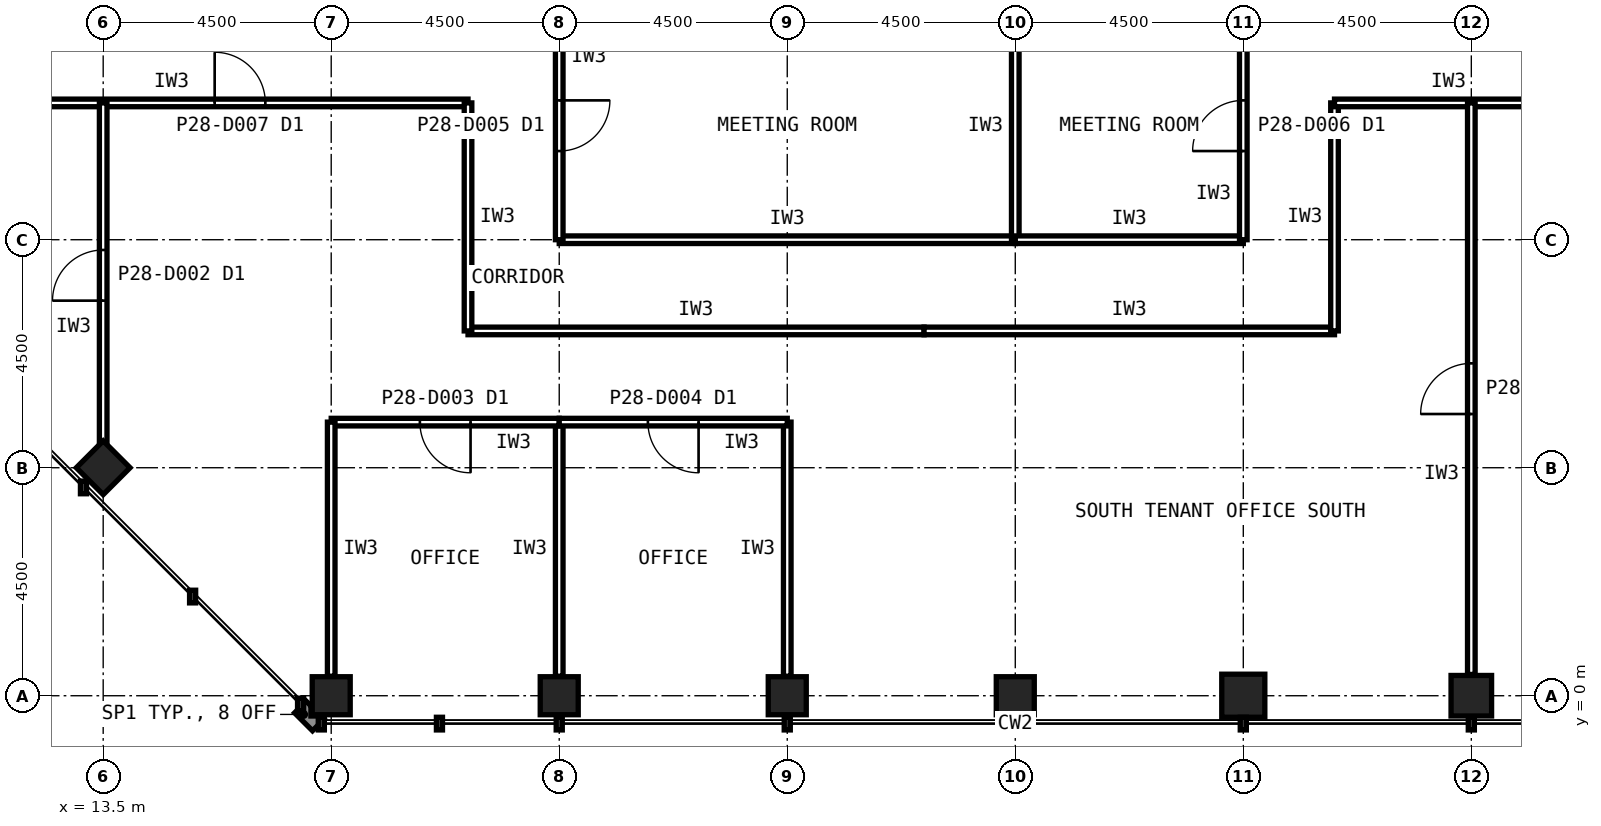
"""IFC4 building model, lengths in metres.
Left out: names, types, materials, properties, quantities, classifications, styles, units other than length and angle.
Written with IfcOpenShell. Run it as: python <this file> out.ifc"""

import sys

from ifc_helpers import new_model, si_unit, direction, frame, frame_2d, origin, origin_2d, place, context, subcontext, project, spatial, rectangle, hollow_rectangle, extrude, element, fill, save


model = new_model("IFC4")
c1 = context("Model", 3, precision=1e-05, world=origin(), true_north=direction((0.0, 1.0)))
c2 = subcontext(c1, "Body", "Model", "MODEL_VIEW")
j1 = project(units=[si_unit("LENGTHUNIT", "METRE"), si_unit("PLANEANGLEUNIT", "RADIAN")], contexts=[c1])
p1 = place(None, origin())
s1 = spatial("IfcSite", under=j1, at=p1, CompositionType="ELEMENT")
p2 = place(p1, origin())
s2 = spatial("IfcBuilding", under=s1, at=p2, CompositionType="ELEMENT")
p3 = place(p2, frame((0.0, 0.0, 119.6)))
s3 = spatial("IfcBuildingStorey", under=s2, at=p3, CompositionType="ELEMENT", Elevation=119.6)
for number, where, z_axis, x_axis in (
    (1, (18.0, 0.0, 0.0), (0.0, 0.0, 1.0), (1.0, 0.0, 0.0)),
    (2, (22.5, 0.0, 0.0), (0.0, 0.0, 1.0), (1.0, 0.0, 0.0)),
    (3, (27.0, 0.0, 0.0), (0.0, 0.0, 1.0), (1.0, 0.0, 0.0)),
    (4, (31.5, 0.0, 0.0), (0.0, 0.0, 1.0), (1.0, 0.0, 0.0)),
):
    element("IfcColumn", number, at=place(p3, frame(where, z_axis=z_axis, x_axis=x_axis)), inside=s3, PredefinedType="COLUMN", context=c2, shape_type="SweptSolid", body=[
        extrude(hollow_rectangle(XDim=0.75, YDim=0.75, WallThickness=0.04, at=origin_2d()), origin(), (0.0, 0.0, 1.0), 4.0),
    ])
p4 = place(p3, frame((36.0, 0.0, 0.0), z_axis=(0.0, 0.0, 1.0), x_axis=(1.0, 0.0, 0.0)))
e5 = element("IfcColumn", 5, at=p4, inside=s3, PredefinedType="COLUMN", context=c2, shape_type="SweptSolid", body=[
    extrude(hollow_rectangle(XDim=0.85, YDim=0.85, WallThickness=0.05, at=origin_2d()), origin(), (0.0, 0.0, 1.0), 4.0),
])
p5 = place(p3, frame((40.5, 0.0, 0.0), z_axis=(0.0, 0.0, 1.0), x_axis=(1.0, 0.0, 0.0)))
e6 = element("IfcColumn", 6, at=p5, inside=s3, PredefinedType="COLUMN", context=c2, shape_type="SweptSolid", body=[
    extrude(hollow_rectangle(XDim=0.8, YDim=0.8, WallThickness=0.045, at=origin_2d()), origin(), (0.0, 0.0, 1.0), 4.0),
])
p6 = place(p3, frame((13.5, 4.5, 0.0), z_axis=(0.0, 0.0, 1.0), x_axis=(0.707106781187, 0.707106781187, 0.0)))
e7 = element("IfcColumn", 7, at=p6, inside=s3, PredefinedType="COLUMN", context=c2, shape_type="SweptSolid", body=[
    extrude(hollow_rectangle(XDim=0.75, YDim=0.75, WallThickness=0.04, at=origin_2d()), origin(), (0.0, 0.0, 1.0), 4.0),
])
p7 = place(p3, frame((11.7, 11.7, 0.0), z_axis=(0.0, 0.0, 1.0), x_axis=(1.0, 0.0, 0.0)))
e8 = element("IfcWall", 8, at=p7, inside=s3, PredefinedType="PARTITIONING", context=c2, shape_type="SweptSolid", body=[
    extrude(rectangle(XDim=9.0, YDim=0.15, at=frame_2d((4.5, 0.0))), origin(), (0.0, 0.0, 1.0), 3.84),
])
p8 = place(p7, frame((4.0, 0.0, 0.0)))
e9 = element("IfcOpeningElement", 9, at=p8, cuts=e8, PredefinedType="OPENING", context=c2, shape_type="SweptSolid", body=[
    extrude(rectangle(XDim=1.0, YDim=2.1, at=frame_2d((0.5, 1.05))), frame((0.0, 0.085, 0.0), z_axis=(0.0, -1.0, 0.0), x_axis=(1.0, 0.0, 0.0)), (0.0, 0.0, 1.0), 0.17),
])
p9 = place(p3, frame((20.7, 7.2, 0.0), z_axis=(0.0, 0.0, 1.0), x_axis=(1.0, 0.0, 0.0)))
e10 = element("IfcWall", 10, at=p9, inside=s3, PredefinedType="PARTITIONING", context=c2, shape_type="SweptSolid", body=[
    extrude(rectangle(XDim=9.0, YDim=0.15, at=frame_2d((4.5, 0.0))), origin(), (0.0, 0.0, 1.0), 3.84),
])
p10 = place(p3, frame((29.7, 7.2, 0.0), z_axis=(0.0, 0.0, 1.0), x_axis=(1.0, 0.0, 0.0)))
e11 = element("IfcWall", 11, at=p10, inside=s3, PredefinedType="PARTITIONING", context=c2, shape_type="SweptSolid", body=[
    extrude(rectangle(XDim=8.1, YDim=0.15, at=frame_2d((4.05, 0.0))), origin(), (0.0, 0.0, 1.0), 3.84),
])
for number, where, z_axis, x_axis in (
    (12, (20.7, 11.7, 0.0), (0.0, 0.0, 1.0), (0.0, -1.0, 0.0)),
    (13, (37.8, 7.2, 0.0), (0.0, 0.0, 1.0), (0.0, 1.0, 0.0)),
    (14, (37.8, 11.7, 0.0), (0.0, 0.0, 1.0), (1.0, 0.0, 0.0)),
):
    element("IfcWall", number, at=place(p3, frame(where, z_axis=z_axis, x_axis=x_axis)), inside=s3, PredefinedType="PARTITIONING", context=c2, shape_type="SweptSolid", body=[
        extrude(rectangle(XDim=4.5, YDim=0.15, at=frame_2d((2.25, 0.0))), origin(), (0.0, 0.0, 1.0), 3.84),
    ])
p11 = place(p3, frame((22.5, 9.0, 0.0), z_axis=(0.0, 0.0, 1.0), x_axis=(1.0, 0.0, 0.0)))
e15 = element("IfcWall", 15, at=p11, inside=s3, PredefinedType="PARTITIONING", context=c2, shape_type="SweptSolid", body=[
    extrude(rectangle(XDim=9.0, YDim=0.15, at=frame_2d((4.5, 0.0))), origin(), (0.0, 0.0, 1.0), 3.84),
])
p12 = place(p3, frame((31.5, 9.0, 0.0), z_axis=(0.0, 0.0, 1.0), x_axis=(0.0, 1.0, 0.0)))
e16 = element("IfcWall", 16, at=p12, inside=s3, PredefinedType="PARTITIONING", context=c2, shape_type="SweptSolid", body=[
    extrude(rectangle(XDim=4.5, YDim=0.15, at=frame_2d((2.25, 0.0))), origin(), (0.0, 0.0, 1.0), 2.989),
])
p13 = place(p3, frame((22.5, 13.5, 0.0), z_axis=(0.0, 0.0, 1.0), x_axis=(0.0, -1.0, 0.0)))
e17 = element("IfcWall", 17, at=p13, inside=s3, PredefinedType="PARTITIONING", context=c2, shape_type="SweptSolid", body=[
    extrude(rectangle(XDim=4.5, YDim=0.15, at=frame_2d((2.25, 0.0))), origin(), (0.0, 0.0, 1.0), 2.989),
])
p14 = place(p13, frame((1.75, 0.0, 0.0)))
e18 = element("IfcOpeningElement", 18, at=p14, cuts=e17, PredefinedType="OPENING", context=c2, shape_type="SweptSolid", body=[
    extrude(rectangle(XDim=1.0, YDim=2.1, at=frame_2d((0.5, 1.05))), frame((0.0, 0.085, 0.0), z_axis=(0.0, -1.0, 0.0), x_axis=(1.0, 0.0, 0.0)), (0.0, 0.0, 1.0), 0.17),
])
p15 = place(p3, frame((22.5, 0.385, 0.0), z_axis=(0.0, 0.0, 1.0), x_axis=(0.0, 1.0, 0.0)))
e19 = element("IfcWall", 19, at=p15, inside=s3, PredefinedType="PARTITIONING", context=c2, shape_type="SweptSolid", body=[
    extrude(rectangle(XDim=5.015, YDim=0.15, at=frame_2d((2.507, 0.0))), origin(), (0.0, 0.0, 1.0), 2.989),
])
p16 = place(p3, frame((22.5, 5.4, 0.0), z_axis=(0.0, 0.0, 1.0), x_axis=(-1.0, 0.0, 0.0)))
e20 = element("IfcWall", 20, at=p16, inside=s3, PredefinedType="PARTITIONING", context=c2, shape_type="SweptSolid", body=[
    extrude(rectangle(XDim=4.5, YDim=0.15, at=frame_2d((2.25, 0.0))), origin(), (0.0, 0.0, 1.0), 3.84),
])
p17 = place(p16, frame((1.75, 0.0, 0.0)))
e21 = element("IfcOpeningElement", 21, at=p17, cuts=e20, PredefinedType="OPENING", context=c2, shape_type="SweptSolid", body=[
    extrude(rectangle(XDim=1.0, YDim=2.1, at=frame_2d((0.5, 1.05))), frame((0.0, 0.085, 0.0), z_axis=(0.0, -1.0, 0.0), x_axis=(1.0, 0.0, 0.0)), (0.0, 0.0, 1.0), 0.17),
])
for number, where, z_axis, x_axis in (
    (22, (18.0, 5.4, 0.0), (0.0, 0.0, 1.0), (0.0, -1.0, 0.0)),
    (23, (27.0, 0.385, 0.0), (0.0, 0.0, 1.0), (0.0, 1.0, 0.0)),
):
    element("IfcWall", number, at=place(p3, frame(where, z_axis=z_axis, x_axis=x_axis)), inside=s3, PredefinedType="PARTITIONING", context=c2, shape_type="SweptSolid", body=[
        extrude(rectangle(XDim=5.015, YDim=0.15, at=frame_2d((2.507, 0.0))), origin(), (0.0, 0.0, 1.0), 2.989),
    ])
p18 = place(p3, frame((27.0, 5.4, 0.0), z_axis=(0.0, 0.0, 1.0), x_axis=(-1.0, 0.0, 0.0)))
e24 = element("IfcWall", 24, at=p18, inside=s3, PredefinedType="PARTITIONING", context=c2, shape_type="SweptSolid", body=[
    extrude(rectangle(XDim=4.5, YDim=0.15, at=frame_2d((2.25, 0.0))), origin(), (0.0, 0.0, 1.0), 3.84),
])
p19 = place(p18, frame((1.75, 0.0, 0.0)))
e25 = element("IfcOpeningElement", 25, at=p19, cuts=e24, PredefinedType="OPENING", context=c2, shape_type="SweptSolid", body=[
    extrude(rectangle(XDim=1.0, YDim=2.1, at=frame_2d((0.5, 1.05))), frame((0.0, 0.085, 0.0), z_axis=(0.0, -1.0, 0.0), x_axis=(1.0, 0.0, 0.0)), (0.0, 0.0, 1.0), 0.17),
])
p20 = place(p3, frame((31.5, 9.0, 0.0), z_axis=(0.0, 0.0, 1.0), x_axis=(1.0, 0.0, 0.0)))
e26 = element("IfcWall", 26, at=p20, inside=s3, PredefinedType="PARTITIONING", context=c2, shape_type="SweptSolid", body=[
    extrude(rectangle(XDim=4.5, YDim=0.15, at=frame_2d((2.25, 0.0))), origin(), (0.0, 0.0, 1.0), 3.84),
])
p21 = place(p3, frame((36.0, 9.0, 0.0), z_axis=(0.0, 0.0, 1.0), x_axis=(0.0, 1.0, 0.0)))
e27 = element("IfcWall", 27, at=p21, inside=s3, PredefinedType="PARTITIONING", context=c2, shape_type="SweptSolid", body=[
    extrude(rectangle(XDim=4.5, YDim=0.15, at=frame_2d((2.25, 0.0))), origin(), (0.0, 0.0, 1.0), 2.989),
])
p22 = place(p21, frame((1.75, 0.0, 0.0)))
e28 = element("IfcOpeningElement", 28, at=p22, cuts=e27, PredefinedType="OPENING", context=c2, shape_type="SweptSolid", body=[
    extrude(rectangle(XDim=1.0, YDim=2.1, at=frame_2d((0.5, 1.05))), frame((0.0, 0.085, 0.0), z_axis=(0.0, -1.0, 0.0), x_axis=(1.0, 0.0, 0.0)), (0.0, 0.0, 1.0), 0.17),
])
p23 = place(p3, frame((40.5, 0.42, 0.0), z_axis=(0.0, 0.0, 1.0), x_axis=(0.0, 1.0, 0.0)))
e29 = element("IfcWall", 29, at=p23, inside=s3, PredefinedType="PARTITIONING", context=c2, shape_type="SweptSolid", body=[
    extrude(rectangle(XDim=11.28, YDim=0.15, at=frame_2d((5.64, 0.0))), origin(), (0.0, 0.0, 1.0), 2.989),
])
p24 = place(p23, frame((5.14, 0.0, 0.0)))
e30 = element("IfcOpeningElement", 30, at=p24, cuts=e29, PredefinedType="OPENING", context=c2, shape_type="SweptSolid", body=[
    extrude(rectangle(XDim=1.0, YDim=2.1, at=frame_2d((0.5, 1.05))), frame((0.0, 0.085, 0.0), z_axis=(0.0, -1.0, 0.0), x_axis=(1.0, 0.0, 0.0)), (0.0, 0.0, 1.0), 0.17),
])
p25 = place(p3, frame((13.5, 4.895, 0.0), z_axis=(0.0, 0.0, 1.0), x_axis=(0.0, 1.0, 0.0)))
e31 = element("IfcWall", 31, at=p25, inside=s3, PredefinedType="PARTITIONING", context=c2, shape_type="SweptSolid", body=[
    extrude(rectangle(XDim=6.805, YDim=0.15, at=frame_2d((3.402, 0.0))), origin(), (0.0, 0.0, 1.0), 2.989),
])
p26 = place(p25, frame((2.903, 0.0, 0.0)))
e32 = element("IfcOpeningElement", 32, at=p26, cuts=e31, PredefinedType="OPENING", context=c2, shape_type="SweptSolid", body=[
    extrude(rectangle(XDim=1.0, YDim=2.1, at=frame_2d((0.5, 1.05))), frame((0.0, 0.085, 0.0), z_axis=(0.0, -1.0, 0.0), x_axis=(1.0, 0.0, 0.0)), (0.0, 0.0, 1.0), 0.17),
])
p27 = place(p8, origin())
e33 = element("IfcDoor", 33, at=p27, inside=s3, OperationType="SINGLE_SWING_LEFT", PredefinedType="DOOR", context=c2, shape_type="SweptSolid", body=[
    extrude(rectangle(XDim=1.0, YDim=2.1, at=frame_2d((0.5, 1.05))), frame((0.0, 0.025, 0.0), z_axis=(0.0, -1.0, 0.0), x_axis=(1.0, 0.0, 0.0)), (0.0, 0.0, 1.0), 0.05),
])
fill(e9, e33)
p28 = place(p14, origin())
e34 = element("IfcDoor", 34, at=p28, inside=s3, OperationType="SINGLE_SWING_LEFT", PredefinedType="DOOR", context=c2, shape_type="SweptSolid", body=[
    extrude(rectangle(XDim=1.0, YDim=2.1, at=frame_2d((0.5, 1.05))), frame((0.0, 0.025, 0.0), z_axis=(0.0, -1.0, 0.0), x_axis=(1.0, 0.0, 0.0)), (0.0, 0.0, 1.0), 0.05),
])
fill(e18, e34)
p29 = place(p17, origin())
e35 = element("IfcDoor", 35, at=p29, inside=s3, OperationType="SINGLE_SWING_LEFT", PredefinedType="DOOR", context=c2, shape_type="SweptSolid", body=[
    extrude(rectangle(XDim=1.0, YDim=2.1, at=frame_2d((0.5, 1.05))), frame((0.0, 0.025, 0.0), z_axis=(0.0, -1.0, 0.0), x_axis=(1.0, 0.0, 0.0)), (0.0, 0.0, 1.0), 0.05),
])
fill(e21, e35)
p30 = place(p19, origin())
e36 = element("IfcDoor", 36, at=p30, inside=s3, OperationType="SINGLE_SWING_LEFT", PredefinedType="DOOR", context=c2, shape_type="SweptSolid", body=[
    extrude(rectangle(XDim=1.0, YDim=2.1, at=frame_2d((0.5, 1.05))), frame((0.0, 0.025, 0.0), z_axis=(0.0, -1.0, 0.0), x_axis=(1.0, 0.0, 0.0)), (0.0, 0.0, 1.0), 0.05),
])
fill(e25, e36)
p31 = place(p22, origin())
e37 = element("IfcDoor", 37, at=p31, inside=s3, OperationType="SINGLE_SWING_LEFT", PredefinedType="DOOR", context=c2, shape_type="SweptSolid", body=[
    extrude(rectangle(XDim=1.0, YDim=2.1, at=frame_2d((0.5, 1.05))), frame((0.0, 0.025, 0.0), z_axis=(0.0, -1.0, 0.0), x_axis=(1.0, 0.0, 0.0)), (0.0, 0.0, 1.0), 0.05),
])
fill(e28, e37)
p32 = place(p24, origin())
e38 = element("IfcDoor", 38, at=p32, inside=s3, OperationType="SINGLE_SWING_LEFT", PredefinedType="DOOR", context=c2, shape_type="SweptSolid", body=[
    extrude(rectangle(XDim=1.0, YDim=2.1, at=frame_2d((0.5, 1.05))), frame((0.0, 0.025, 0.0), z_axis=(0.0, -1.0, 0.0), x_axis=(1.0, 0.0, 0.0)), (0.0, 0.0, 1.0), 0.05),
])
fill(e30, e38)
p33 = place(p26, origin())
e39 = element("IfcDoor", 39, at=p33, inside=s3, OperationType="SINGLE_SWING_LEFT", PredefinedType="DOOR", context=c2, shape_type="SweptSolid", body=[
    extrude(rectangle(XDim=1.0, YDim=2.1, at=frame_2d((0.5, 1.05))), frame((0.0, 0.025, 0.0), z_axis=(0.0, -1.0, 0.0), x_axis=(1.0, 0.0, 0.0)), (0.0, 0.0, 1.0), 0.05),
])
fill(e32, e39)
save(model, sys.argv[1])
